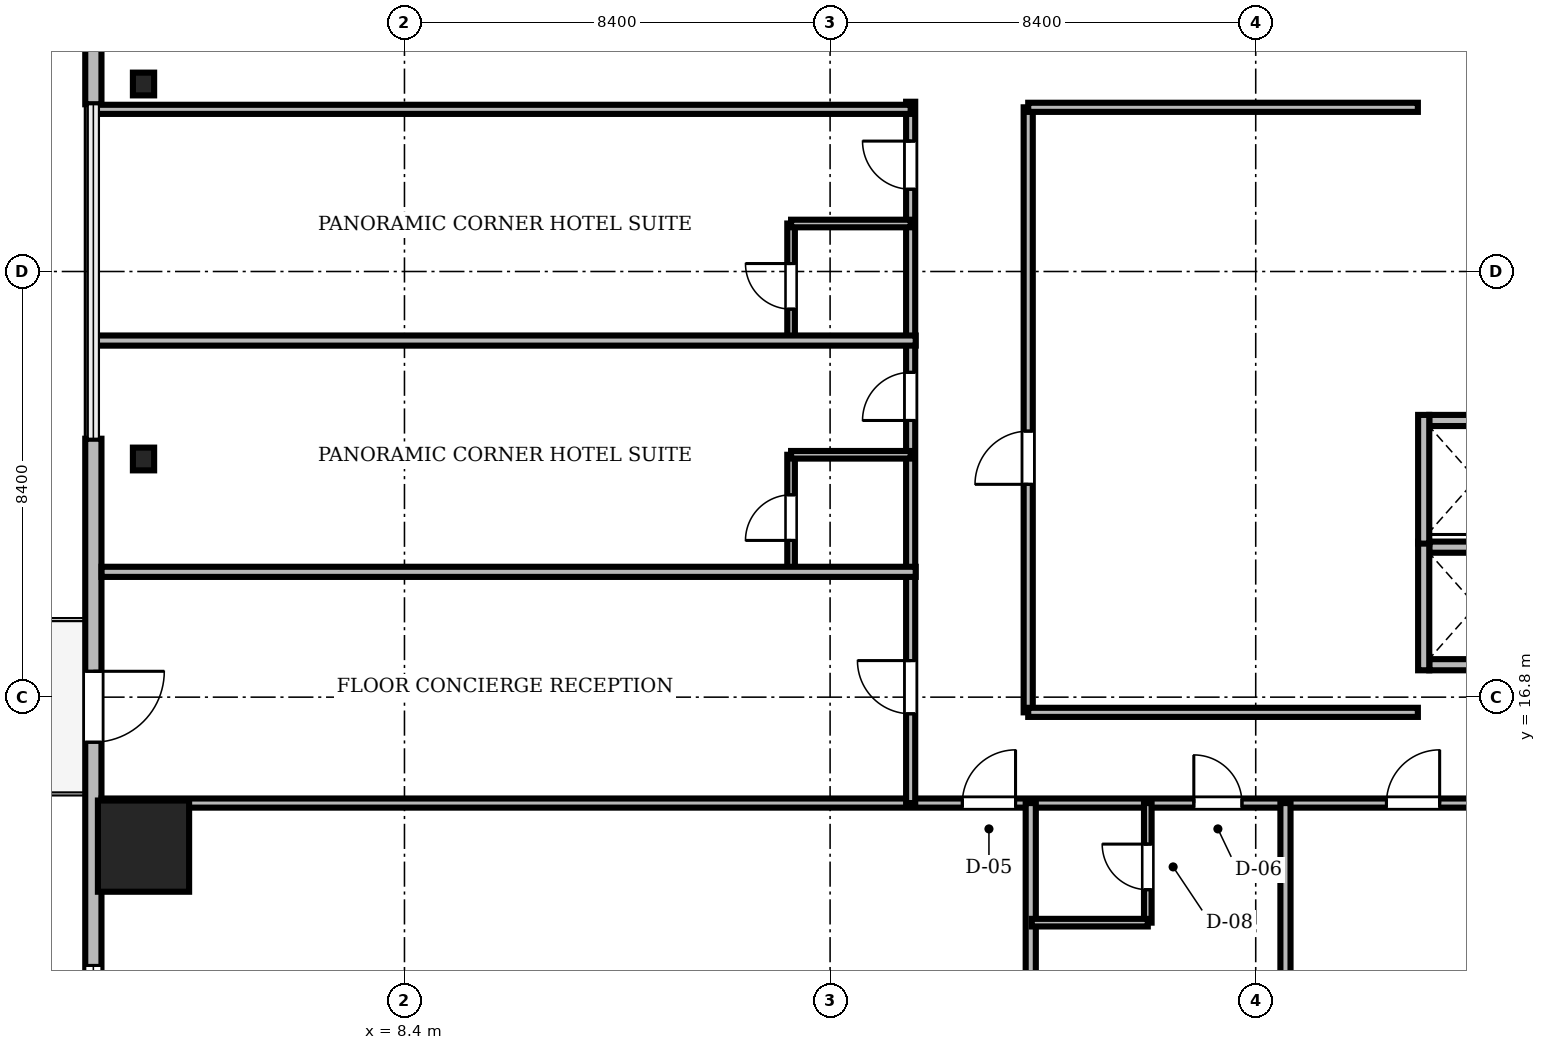
"""IFC4 building model, lengths in metres.
Left out: names, types, materials, properties, quantities, classifications, styles, units other than length and angle.
Written with IfcOpenShell. Run it as: python <this file> out.ifc"""

import sys

from ifc_helpers import new_model, si_unit, direction, frame, frame_2d, origin, origin_2d, place, context, subcontext, project, spatial, rectangle, i_section, extrude, source, transform, mapped, element, fill, save


model = new_model("IFC4")
c1 = context("Model", 3, precision=1e-05, world=origin(), true_north=direction((0.0, 1.0)))
c2 = subcontext(c1, "Body", "Model", "MODEL_VIEW")
j1 = project(units=[si_unit("LENGTHUNIT", "METRE"), si_unit("PLANEANGLEUNIT", "RADIAN")], contexts=[c1])
p1 = place(None, origin())
s1 = spatial("IfcSite", under=j1, at=p1, CompositionType="ELEMENT")
p2 = place(p1, origin())
s2 = spatial("IfcBuilding", under=s1, at=p2, CompositionType="ELEMENT")
p3 = place(p2, frame((0.0, 0.0, 38.55)))
s3 = spatial("IfcBuildingStorey", under=s2, at=p3, CompositionType="ELEMENT", Elevation=38.55)
m1 = source(origin(), c2, "Body", "SweptSolid", [
    extrude(rectangle(XDim=1.8, YDim=1.8, at=origin_2d()), origin(), (0.0, 0.0, 1.0), 3.41),
])
p4 = place(p3, frame((3.25, 13.86, 0.0), z_axis=(0.0, 0.0, 1.0), x_axis=(1.0, 0.0, 0.0)))
e1 = element("IfcColumn", 1, at=p4, inside=s3, PredefinedType="COLUMN", context=c2, shape_type="MappedRepresentation", body=[
    mapped(m1, transform((0.0, 0.0, 0.0), scale=1.0)),
])
m2 = source(origin(), c2, "Body", "SweptSolid", [
    extrude(i_section(OverallWidth=0.419, OverallDepth=0.449, WebThickness=0.031, FlangeThickness=0.048, FilletRadius=0.015, at=origin_2d()), origin(), (0.0, 0.0, 1.0), 3.41),
])
for number, where, z_axis, x_axis in (
    (2, (3.25, 28.9, 0.0), (0.0, 0.0, 1.0), (1.0, 0.0, 0.0)),
    (3, (3.25, 21.5, 0.0), (0.0, 0.0, 1.0), (1.0, 0.0, 0.0)),
):
    element("IfcColumn", number, at=place(p3, frame(where, z_axis=z_axis, x_axis=x_axis)), inside=s3, PredefinedType="COLUMN", context=c2, shape_type="MappedRepresentation", body=[
        mapped(m2, transform((0.0, 0.0, 0.0), scale=1.0)),
    ])
m3 = source(origin(), c2, "Body", "SweptSolid", [
    extrude(rectangle(XDim=15.6, YDim=0.32, at=frame_2d((7.8, 0.0))), origin(), (0.0, 0.0, 1.0), 3.41),
])
p5 = place(p3, frame((2.26, 44.1, 0.0), z_axis=(0.0, 0.0, 1.0), x_axis=(0.0, -1.0, 0.0)))
e4 = element("IfcWall", 4, at=p5, inside=s3, PredefinedType="SOLIDWALL", context=c2, shape_type="MappedRepresentation", body=[
    mapped(m3, transform((0.0, 0.0, 0.0), scale=1.0)),
])
m4 = source(origin(), c2, "Body", "SweptSolid", [
    extrude(rectangle(XDim=2.2, YDim=2.4, at=frame_2d((1.1, 1.2))), frame((0.0, 0.17, 0.0), z_axis=(0.0, -1.0, 0.0), x_axis=(1.0, 0.0, 0.0)), (0.0, 0.0, 1.0), 0.34),
])
p6 = place(p5, frame((3.005, 0.0, 0.72)))
e5 = element("IfcOpeningElement", 5, at=p6, cuts=e4, PredefinedType="OPENING", context=c2, shape_type="MappedRepresentation", body=[
    mapped(m4, transform((0.0, 0.0, 0.0), scale=1.0)),
])
m5 = source(origin(), c2, "Body", "SweptSolid", [
    extrude(rectangle(XDim=15.6, YDim=0.32, at=frame_2d((7.8, 0.0))), origin(), (0.0, 0.0, 1.0), 3.41),
])
p7 = place(p3, frame((2.26, 21.9, 0.0), z_axis=(0.0, 0.0, 1.0), x_axis=(0.0, -1.0, 0.0)))
e6 = element("IfcWall", 6, at=p7, inside=s3, PredefinedType="SOLIDWALL", context=c2, shape_type="MappedRepresentation", body=[
    mapped(m5, transform((0.0, 0.0, 0.0), scale=1.0)),
])
m6 = source(origin(), c2, "Body", "SweptSolid", [
    extrude(rectangle(XDim=1.4, YDim=2.3, at=frame_2d((0.7, 1.15))), frame((0.0, 0.17, 0.0), z_axis=(0.0, -1.0, 0.0), x_axis=(1.0, 0.0, 0.0)), (0.0, 0.0, 1.0), 0.34),
])
p8 = place(p7, frame((4.59, 0.0, 0.0)))
e7 = element("IfcOpeningElement", 7, at=p8, cuts=e6, PredefinedType="OPENING", context=c2, shape_type="MappedRepresentation", body=[
    mapped(m6, transform((0.0, 0.0, 0.0), scale=1.0)),
])
p9 = place(p7, frame((10.395, 0.0, 0.72)))
e8 = element("IfcOpeningElement", 8, at=p9, cuts=e6, PredefinedType="OPENING", context=c2, shape_type="MappedRepresentation", body=[
    mapped(m4, transform((0.0, 0.0, 0.0), scale=1.0)),
])
m7 = source(origin(), c2, "Body", "SweptSolid", [
    extrude(rectangle(XDim=1.85, YDim=0.22, at=frame_2d((0.925, 0.0))), origin(), (0.0, 0.0, 1.0), 3.41),
])
for number, where, z_axis, x_axis in (
    (9, (28.625, 17.44, 0.0), (0.0, 0.0, 1.0), (1.0, 0.0, 0.0)),
    (10, (28.625, 19.76, 0.0), (0.0, 0.0, 1.0), (1.0, 0.0, 0.0)),
):
    element("IfcWall", number, at=place(p3, frame(where, z_axis=z_axis, x_axis=x_axis)), inside=s3, PredefinedType="SOLIDWALL", context=c2, shape_type="MappedRepresentation", body=[
        mapped(m7, transform((0.0, 0.0, 0.0), scale=1.0)),
    ])
m8 = source(origin(), c2, "Body", "SweptSolid", [
    extrude(rectangle(XDim=2.54, YDim=0.22, at=frame_2d((1.27, 0.0))), origin(), (0.0, 0.0, 1.0), 3.41),
])
p10 = place(p3, frame((28.515, 17.33, 0.0), z_axis=(0.0, 0.0, 1.0), x_axis=(0.0, 1.0, 0.0)))
e11 = element("IfcWall", 11, at=p10, inside=s3, PredefinedType="SOLIDWALL", context=c2, shape_type="MappedRepresentation", body=[
    mapped(m8, transform((0.0, 0.0, 0.0), scale=1.0)),
])
p11 = place(p3, frame((28.625, 22.26, 0.0), z_axis=(0.0, 0.0, 1.0), x_axis=(1.0, 0.0, 0.0)))
e12 = element("IfcWall", 12, at=p11, inside=s3, PredefinedType="SOLIDWALL", context=c2, shape_type="MappedRepresentation", body=[
    mapped(m7, transform((0.0, 0.0, 0.0), scale=1.0)),
])
p12 = place(p3, frame((28.515, 19.83, 0.0), z_axis=(0.0, 0.0, 1.0), x_axis=(0.0, 1.0, 0.0)))
e13 = element("IfcWall", 13, at=p12, inside=s3, PredefinedType="SOLIDWALL", context=c2, shape_type="MappedRepresentation", body=[
    mapped(m8, transform((0.0, 0.0, 0.0), scale=1.0)),
])
m9 = source(origin(), c2, "Body", "SweptSolid", [
    extrude(rectangle(XDim=46.156, YDim=0.18, at=frame_2d((23.078, 0.0))), origin(), (0.0, 0.0, 1.0), 2.652),
])
p13 = place(p3, frame((2.422, 14.71, 0.0), z_axis=(0.0, 0.0, 1.0), x_axis=(1.0, 0.0, 0.0)))
e14 = element("IfcWall", 14, at=p13, inside=s3, PredefinedType="PARTITIONING", context=c2, shape_type="MappedRepresentation", body=[
    mapped(m9, transform((0.0, 0.0, 0.0), scale=1.0)),
])
m10 = source(origin(), c2, "Body", "SweptSolid", [
    extrude(rectangle(XDim=1.05, YDim=2.2, at=frame_2d((0.525, 1.1))), frame((0.0, 0.1, 0.0), z_axis=(0.0, -1.0, 0.0), x_axis=(1.0, 0.0, 0.0)), (0.0, 0.0, 1.0), 0.2),
])
p14 = place(p13, frame((16.988, 0.0, 0.0)))
e15 = element("IfcOpeningElement", 15, at=p14, cuts=e14, PredefinedType="OPENING", context=c2, shape_type="MappedRepresentation", body=[
    mapped(m10, transform((0.0, 0.0, 0.0), scale=1.0)),
])
m11 = source(origin(), c2, "Body", "SweptSolid", [
    extrude(rectangle(XDim=0.95, YDim=2.15, at=frame_2d((0.475, 1.075))), frame((0.0, 0.1, 0.0), z_axis=(0.0, -1.0, 0.0), x_axis=(1.0, 0.0, 0.0)), (0.0, 0.0, 1.0), 0.2),
])
p15 = place(p13, frame((21.556, 0.0, 0.0)))
e16 = element("IfcOpeningElement", 16, at=p15, cuts=e14, PredefinedType="OPENING", context=c2, shape_type="MappedRepresentation", body=[
    mapped(m11, transform((0.0, 0.0, 0.0), scale=1.0)),
])
p16 = place(p13, frame((25.358, 0.0, 0.0)))
e17 = element("IfcOpeningElement", 17, at=p16, cuts=e14, PredefinedType="OPENING", context=c2, shape_type="MappedRepresentation", body=[
    mapped(m10, transform((0.0, 0.0, 0.0), scale=1.0)),
])
p17 = place(p13, frame((30.385, 0.0, 0.0)))
e18 = element("IfcOpeningElement", 18, at=p17, cuts=e14, PredefinedType="OPENING", context=c2, shape_type="MappedRepresentation", body=[
    mapped(m10, transform((0.0, 0.0, 0.0), scale=1.0)),
])
p18 = place(p13, frame((35.411, 0.0, 0.0)))
e19 = element("IfcOpeningElement", 19, at=p18, cuts=e14, PredefinedType="OPENING", context=c2, shape_type="MappedRepresentation", body=[
    mapped(m10, transform((0.0, 0.0, 0.0), scale=1.0)),
])
p19 = place(p13, frame((41.766, 0.0, 0.0)))
e20 = element("IfcOpeningElement", 20, at=p19, cuts=e14, PredefinedType="OPENING", context=c2, shape_type="MappedRepresentation", body=[
    mapped(m10, transform((0.0, 0.0, 0.0), scale=1.0)),
])
m12 = source(origin(), c2, "Body", "SweptSolid", [
    extrude(rectangle(XDim=13.84, YDim=0.18, at=frame_2d((6.92, 0.0))), origin(), (0.0, 0.0, 1.0), 2.802),
])
p20 = place(p3, frame((18.39, 14.71, 0.0), z_axis=(0.0, 0.0, 1.0), x_axis=(0.0, 1.0, 0.0)))
e21 = element("IfcWall", 21, at=p20, inside=s3, PredefinedType="PARTITIONING", context=c2, shape_type="MappedRepresentation", body=[
    mapped(m12, transform((0.0, 0.0, 0.0), scale=1.0)),
])
p21 = place(p20, frame((1.762, 0.0, 0.0)))
e22 = element("IfcOpeningElement", 22, at=p21, cuts=e21, PredefinedType="OPENING", context=c2, shape_type="MappedRepresentation", body=[
    mapped(m10, transform((0.0, 0.0, 0.0), scale=1.0)),
])
p22 = place(p20, frame((7.55, 0.0, 0.0)))
e23 = element("IfcOpeningElement", 23, at=p22, cuts=e21, PredefinedType="OPENING", context=c2, shape_type="MappedRepresentation", body=[
    mapped(m11, transform((0.0, 0.0, 0.0), scale=1.0)),
])
p23 = place(p20, frame((12.113, 0.0, 0.0)))
e24 = element("IfcOpeningElement", 24, at=p23, cuts=e21, PredefinedType="OPENING", context=c2, shape_type="MappedRepresentation", body=[
    mapped(m11, transform((0.0, 0.0, 0.0), scale=1.0)),
])
m13 = source(origin(), c2, "Body", "SweptSolid", [
    extrude(rectangle(XDim=11.94, YDim=0.18, at=frame_2d((5.97, 0.0))), origin(), (0.0, 0.0, 1.0), 2.802),
])
p24 = place(p3, frame((20.71, 16.5, 0.0), z_axis=(0.0, 0.0, 1.0), x_axis=(0.0, 1.0, 0.0)))
e25 = element("IfcWall", 25, at=p24, inside=s3, PredefinedType="PARTITIONING", context=c2, shape_type="MappedRepresentation", body=[
    mapped(m13, transform((0.0, 0.0, 0.0), scale=1.0)),
])
p25 = place(p24, frame((4.5, 0.0, 0.0)))
e26 = element("IfcOpeningElement", 26, at=p25, cuts=e25, PredefinedType="OPENING", context=c2, shape_type="MappedRepresentation", body=[
    mapped(m10, transform((0.0, 0.0, 0.0), scale=1.0)),
])
m14 = source(origin(), c2, "Body", "SweptSolid", [
    extrude(rectangle(XDim=2.36, YDim=0.15, at=frame_2d((1.18, 0.0))), origin(), (0.0, 0.0, 1.0), 3.41),
])
p26 = place(p3, frame((23.07, 12.35, 0.0), z_axis=(0.0, 0.0, 1.0), x_axis=(0.0, 1.0, 0.0)))
e27 = element("IfcWall", 27, at=p26, inside=s3, PredefinedType="PARTITIONING", context=c2, shape_type="MappedRepresentation", body=[
    mapped(m14, transform((0.0, 0.0, 0.0), scale=1.0)),
])
m15 = source(origin(), c2, "Body", "SweptSolid", [
    extrude(rectangle(XDim=0.9, YDim=2.1, at=frame_2d((0.45, 1.05))), frame((0.0, 0.085, 0.0), z_axis=(0.0, -1.0, 0.0), x_axis=(1.0, 0.0, 0.0)), (0.0, 0.0, 1.0), 0.17),
])
p27 = place(p26, frame((0.65, 0.0, 0.0)))
e28 = element("IfcOpeningElement", 28, at=p27, cuts=e27, PredefinedType="OPENING", context=c2, shape_type="MappedRepresentation", body=[
    mapped(m15, transform((0.0, 0.0, 0.0), scale=1.0)),
])
m16 = source(origin(), c2, "Body", "SweptSolid", [
    extrude(rectangle(XDim=2.29, YDim=0.15, at=frame_2d((1.145, 0.0))), origin(), (0.0, 0.0, 1.0), 2.802),
])
p28 = place(p3, frame((16.03, 19.293, 0.0), z_axis=(0.0, 0.0, 1.0), x_axis=(0.0, 1.0, 0.0)))
e29 = element("IfcWall", 29, at=p28, inside=s3, PredefinedType="PARTITIONING", context=c2, shape_type="MappedRepresentation", body=[
    mapped(m16, transform((0.0, 0.0, 0.0), scale=1.0)),
])
p29 = place(p28, frame((0.6, 0.0, 0.0)))
e30 = element("IfcOpeningElement", 30, at=p29, cuts=e29, PredefinedType="OPENING", context=c2, shape_type="MappedRepresentation", body=[
    mapped(m15, transform((0.0, 0.0, 0.0), scale=1.0)),
])
m17 = source(origin(), c2, "Body", "SweptSolid", [
    extrude(rectangle(XDim=2.29, YDim=0.15, at=frame_2d((1.145, 0.0))), origin(), (0.0, 0.0, 1.0), 3.41),
])
p30 = place(p3, frame((16.03, 23.857, 0.0), z_axis=(0.0, 0.0, 1.0), x_axis=(0.0, 1.0, 0.0)))
e31 = element("IfcWall", 31, at=p30, inside=s3, PredefinedType="PARTITIONING", context=c2, shape_type="MappedRepresentation", body=[
    mapped(m17, transform((0.0, 0.0, 0.0), scale=1.0)),
])
p31 = place(p30, frame((0.6, 0.0, 0.0)))
e32 = element("IfcOpeningElement", 32, at=p31, cuts=e31, PredefinedType="OPENING", context=c2, shape_type="MappedRepresentation", body=[
    mapped(m15, transform((0.0, 0.0, 0.0), scale=1.0)),
])
m18 = source(origin(), c2, "Body", "SweptSolid", [
    extrude(rectangle(XDim=16.068, YDim=0.2, at=frame_2d((8.034, 0.0))), origin(), (0.0, 0.0, 1.0), 2.652),
])
p32 = place(p3, frame((2.422, 19.273, 0.0), z_axis=(0.0, 0.0, 1.0), x_axis=(1.0, 0.0, 0.0)))
e33 = element("IfcWall", 33, at=p32, inside=s3, PredefinedType="PARTITIONING", context=c2, shape_type="MappedRepresentation", body=[
    mapped(m18, transform((0.0, 0.0, 0.0), scale=1.0)),
])
m19 = source(origin(), c2, "Body", "SweptSolid", [
    extrude(rectangle(XDim=16.26, YDim=0.2, at=frame_2d((8.13, 0.0))), origin(), (0.0, 0.0, 1.0), 2.652),
])
p33 = place(p3, frame((2.23, 23.837, 0.0), z_axis=(0.0, 0.0, 1.0), x_axis=(1.0, 0.0, 0.0)))
e34 = element("IfcWall", 34, at=p33, inside=s3, PredefinedType="PARTITIONING", context=c2, shape_type="MappedRepresentation", body=[
    mapped(m19, transform((0.0, 0.0, 0.0), scale=1.0)),
])
m20 = source(origin(), c2, "Body", "SweptSolid", [
    extrude(rectangle(XDim=16.16, YDim=0.18, at=frame_2d((8.08, 0.0))), origin(), (0.0, 0.0, 1.0), 2.652),
])
p34 = place(p3, frame((2.23, 28.4, 0.0), z_axis=(0.0, 0.0, 1.0), x_axis=(1.0, 0.0, 0.0)))
e35 = element("IfcWall", 35, at=p34, inside=s3, PredefinedType="PARTITIONING", context=c2, shape_type="MappedRepresentation", body=[
    mapped(m20, transform((0.0, 0.0, 0.0), scale=1.0)),
])
m21 = source(origin(), c2, "Body", "SweptSolid", [
    extrude(rectangle(XDim=12.588, YDim=0.2, at=frame_2d((6.294, 0.0))), origin(), (0.0, 0.0, 1.0), 2.652),
])
p35 = place(p3, frame((20.76, 2.122, 0.0), z_axis=(0.0, 0.0, 1.0), x_axis=(0.0, 1.0, 0.0)))
e36 = element("IfcWall", 36, at=p35, inside=s3, PredefinedType="PARTITIONING", context=c2, shape_type="MappedRepresentation", body=[
    mapped(m21, transform((0.0, 0.0, 0.0), scale=1.0)),
])
m22 = source(origin(), c2, "Body", "SweptSolid", [
    extrude(rectangle(XDim=12.78, YDim=0.2, at=frame_2d((6.39, 0.0))), origin(), (0.0, 0.0, 1.0), 2.652),
])
p36 = place(p3, frame((25.787, 1.93, 0.0), z_axis=(0.0, 0.0, 1.0), x_axis=(0.0, 1.0, 0.0)))
e37 = element("IfcWall", 37, at=p36, inside=s3, PredefinedType="PARTITIONING", context=c2, shape_type="MappedRepresentation", body=[
    mapped(m22, transform((0.0, 0.0, 0.0), scale=1.0)),
])
m23 = source(origin(), c2, "Body", "SweptSolid", [
    extrude(rectangle(XDim=7.69, YDim=0.18, at=frame_2d((3.845, 0.0))), origin(), (0.0, 0.0, 1.0), 2.802),
])
p37 = place(p3, frame((20.71, 16.5, 0.0), z_axis=(0.0, 0.0, 1.0), x_axis=(1.0, 0.0, 0.0)))
e38 = element("IfcWall", 38, at=p37, inside=s3, PredefinedType="PARTITIONING", context=c2, shape_type="MappedRepresentation", body=[
    mapped(m23, transform((0.0, 0.0, 0.0), scale=1.0)),
])
m24 = source(origin(), c2, "Body", "SweptSolid", [
    extrude(rectangle(XDim=7.69, YDim=0.18, at=frame_2d((3.845, 0.0))), origin(), (0.0, 0.0, 1.0), 3.41),
])
p38 = place(p3, frame((20.71, 28.44, 0.0), z_axis=(0.0, 0.0, 1.0), x_axis=(1.0, 0.0, 0.0)))
e39 = element("IfcWall", 39, at=p38, inside=s3, PredefinedType="PARTITIONING", context=c2, shape_type="MappedRepresentation", body=[
    mapped(m24, transform((0.0, 0.0, 0.0), scale=1.0)),
])
for number, where, z_axis, x_axis in (
    (40, (16.03, 21.583, 0.0), (0.0, 0.0, 1.0), (1.0, 0.0, 0.0)),
    (41, (16.03, 26.147, 0.0), (0.0, 0.0, 1.0), (1.0, 0.0, 0.0)),
):
    element("IfcWall", number, at=place(p3, frame(where, z_axis=z_axis, x_axis=x_axis)), inside=s3, PredefinedType="PARTITIONING", context=c2, shape_type="MappedRepresentation", body=[
        mapped(m14, transform((0.0, 0.0, 0.0), scale=1.0)),
    ])
p39 = place(p3, frame((20.78, 12.35, 0.0), z_axis=(0.0, 0.0, 1.0), x_axis=(1.0, 0.0, 0.0)))
e42 = element("IfcWall", 42, at=p39, inside=s3, PredefinedType="PARTITIONING", context=c2, shape_type="MappedRepresentation", body=[
    mapped(m17, transform((0.0, 0.0, 0.0), scale=1.0)),
])
m25 = source(origin(), c2, "Body", "SweptSolid", [
    extrude(rectangle(XDim=1.4, YDim=2.3, at=frame_2d((0.7, 1.15))), frame((0.0, 0.025, 0.0), z_axis=(0.0, -1.0, 0.0), x_axis=(1.0, 0.0, 0.0)), (0.0, 0.0, 1.0), 0.05),
])
p40 = place(p8, frame((1.4, 0.0, 0.0), z_axis=(0.0, 0.0, 1.0), x_axis=(-1.0, 0.0, 0.0)))
e43 = element("IfcDoor", 43, at=p40, inside=s3, OperationType="DOUBLE_DOOR_SLIDING", PredefinedType="DOOR", context=c2, shape_type="MappedRepresentation", body=[
    mapped(m25, transform((0.0, 0.0, 0.0), scale=1.0)),
])
fill(e7, e43)
m26 = source(origin(), c2, "Body", "SweptSolid", [
    extrude(rectangle(XDim=2.2, YDim=2.4, at=frame_2d((1.1, 1.2))), frame((0.0, 0.03, 0.0), z_axis=(0.0, -1.0, 0.0), x_axis=(1.0, 0.0, 0.0)), (0.0, 0.0, 1.0), 0.06),
])
p41 = place(p9, origin())
e44 = element("IfcWindow", 44, at=p41, inside=s3, PartitioningType="SINGLE_PANEL", PredefinedType="WINDOW", context=c2, shape_type="MappedRepresentation", body=[
    mapped(m26, transform((0.0, 0.0, 0.0), scale=1.0)),
])
fill(e8, e44)
m27 = source(origin(), c2, "Body", "SweptSolid", [
    extrude(rectangle(XDim=1.05, YDim=2.2, at=frame_2d((0.525, 1.1))), frame((0.0, 0.025, 0.0), z_axis=(0.0, -1.0, 0.0), x_axis=(1.0, 0.0, 0.0)), (0.0, 0.0, 1.0), 0.05),
])
p42 = place(p14, origin())
e45 = element("IfcDoor", 45, at=p42, inside=s3, OperationType="SINGLE_SWING_RIGHT", PredefinedType="DOOR", context=c2, shape_type="MappedRepresentation", body=[
    mapped(m27, transform((0.0, 0.0, 0.0), scale=1.0)),
])
fill(e15, e45)
m28 = source(origin(), c2, "Body", "SweptSolid", [
    extrude(rectangle(XDim=0.95, YDim=2.15, at=frame_2d((0.475, 1.075))), frame((0.0, 0.025, 0.0), z_axis=(0.0, -1.0, 0.0), x_axis=(1.0, 0.0, 0.0)), (0.0, 0.0, 1.0), 0.05),
])
p43 = place(p15, origin())
e46 = element("IfcDoor", 46, at=p43, inside=s3, OperationType="SINGLE_SWING_LEFT", PredefinedType="DOOR", context=c2, shape_type="MappedRepresentation", body=[
    mapped(m28, transform((0.0, 0.0, 0.0), scale=1.0)),
])
fill(e16, e46)
p44 = place(p16, origin())
e47 = element("IfcDoor", 47, at=p44, inside=s3, OperationType="SINGLE_SWING_RIGHT", PredefinedType="DOOR", context=c2, shape_type="MappedRepresentation", body=[
    mapped(m27, transform((0.0, 0.0, 0.0), scale=1.0)),
])
fill(e17, e47)
p45 = place(p21, origin())
e48 = element("IfcDoor", 48, at=p45, inside=s3, OperationType="SINGLE_SWING_RIGHT", PredefinedType="DOOR", context=c2, shape_type="MappedRepresentation", body=[
    mapped(m27, transform((0.0, 0.0, 0.0), scale=1.0)),
])
fill(e22, e48)
p46 = place(p22, origin())
e49 = element("IfcDoor", 49, at=p46, inside=s3, OperationType="SINGLE_SWING_LEFT", PredefinedType="DOOR", context=c2, shape_type="MappedRepresentation", body=[
    mapped(m28, transform((0.0, 0.0, 0.0), scale=1.0)),
])
fill(e23, e49)
p47 = place(p23, origin())
e50 = element("IfcDoor", 50, at=p47, inside=s3, OperationType="SINGLE_SWING_RIGHT", PredefinedType="DOOR", context=c2, shape_type="MappedRepresentation", body=[
    mapped(m28, transform((0.0, 0.0, 0.0), scale=1.0)),
])
fill(e24, e50)
p48 = place(p25, origin())
e51 = element("IfcDoor", 51, at=p48, inside=s3, OperationType="SINGLE_SWING_LEFT", PredefinedType="DOOR", context=c2, shape_type="MappedRepresentation", body=[
    mapped(m27, transform((0.0, 0.0, 0.0), scale=1.0)),
])
fill(e26, e51)
m29 = source(origin(), c2, "Body", "SweptSolid", [
    extrude(rectangle(XDim=0.9, YDim=2.1, at=frame_2d((0.45, 1.05))), frame((0.0, 0.025, 0.0), z_axis=(0.0, -1.0, 0.0), x_axis=(1.0, 0.0, 0.0)), (0.0, 0.0, 1.0), 0.05),
])
p49 = place(p27, origin())
e52 = element("IfcDoor", 52, at=p49, inside=s3, OperationType="SINGLE_SWING_RIGHT", PredefinedType="DOOR", context=c2, shape_type="MappedRepresentation", body=[
    mapped(m29, transform((0.0, 0.0, 0.0), scale=1.0)),
])
fill(e28, e52)
p50 = place(p29, origin())
e53 = element("IfcDoor", 53, at=p50, inside=s3, OperationType="SINGLE_SWING_LEFT", PredefinedType="DOOR", context=c2, shape_type="MappedRepresentation", body=[
    mapped(m29, transform((0.0, 0.0, 0.0), scale=1.0)),
])
fill(e30, e53)
p51 = place(p31, origin())
e54 = element("IfcDoor", 54, at=p51, inside=s3, OperationType="SINGLE_SWING_RIGHT", PredefinedType="DOOR", context=c2, shape_type="MappedRepresentation", body=[
    mapped(m29, transform((0.0, 0.0, 0.0), scale=1.0)),
])
fill(e32, e54)
save(model, sys.argv[1])
